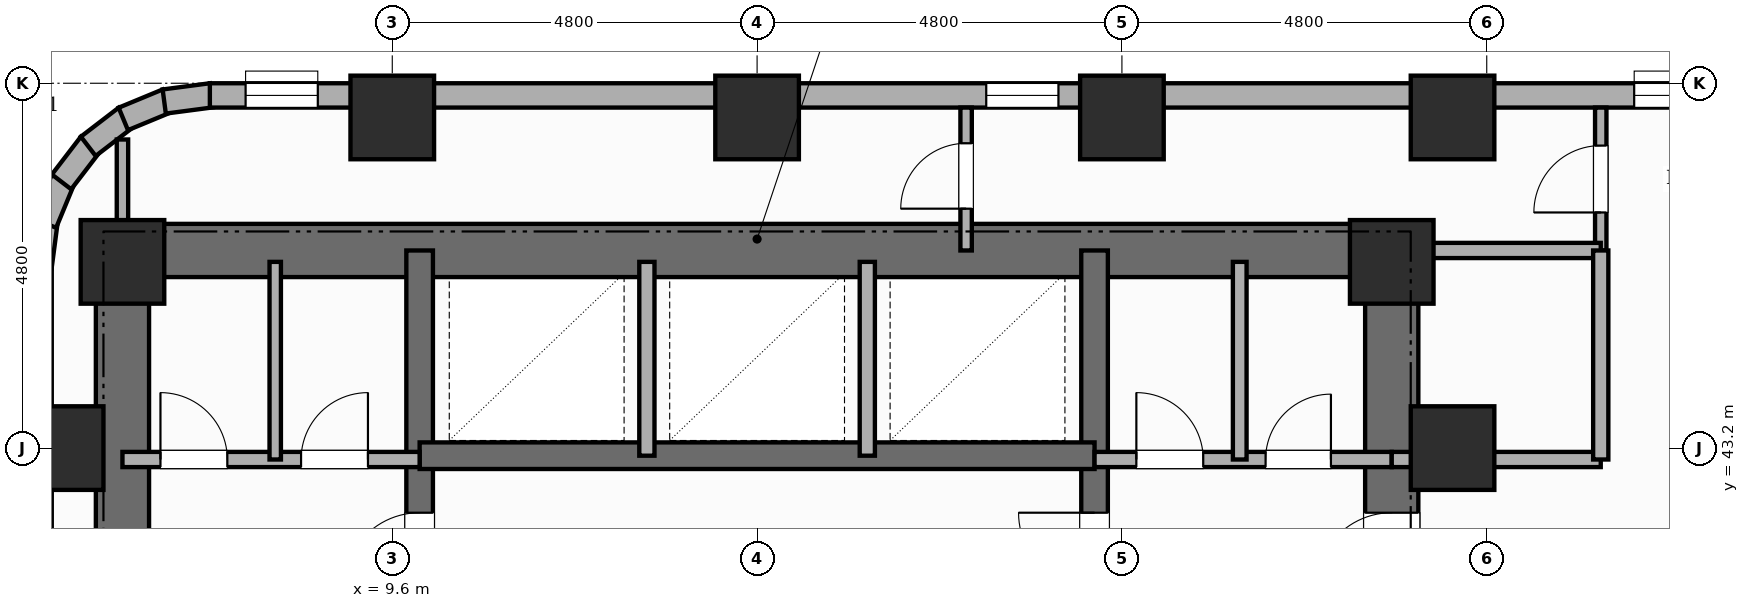
"""IFC4 building model, lengths in metres.
Left out: names, types, materials, properties, quantities, classifications, styles, units other than length and angle.
Written with IfcOpenShell. Run it as: python <this file> out.ifc"""

import sys

from ifc_helpers import new_model, si_unit, direction, frame, frame_2d, origin, origin_2d, place, context, subcontext, project, spatial, rectangle, extrude, element, fill, save


model = new_model("IFC4")
c1 = context("Model", 3, precision=1e-05, world=origin(), true_north=direction((0.0, 1.0)))
c2 = subcontext(c1, "Body", "Model", "MODEL_VIEW")
j1 = project(units=[si_unit("LENGTHUNIT", "METRE"), si_unit("PLANEANGLEUNIT", "RADIAN")], contexts=[c1])
p1 = place(None, origin())
s1 = spatial("IfcSite", under=j1, at=p1, CompositionType="ELEMENT")
p2 = place(p1, origin())
s2 = spatial("IfcBuilding", under=s1, at=p2, CompositionType="ELEMENT")
p3 = place(p2, frame((0.0, 0.0, 46.6)))
s3 = spatial("IfcBuildingStorey", under=s2, at=p3, CompositionType="ELEMENT", Elevation=46.6)
p4 = place(p3, frame((6.05, 30.55, 0.0), z_axis=(0.0, 0.0, 1.0), x_axis=(0.0, 1.0, 0.0)))
e1 = element("IfcWall", 1, at=p4, inside=s3, PredefinedType="SHEAR", context=c2, shape_type="SweptSolid", body=[
    extrude(rectangle(XDim=15.6, YDim=0.7, at=frame_2d((7.8, 0.0))), origin(), (0.0, 0.0, 1.0), 3.6),
])
p5 = place(p3, frame((22.75, 30.55, 0.0), z_axis=(0.0, 0.0, 1.0), x_axis=(0.0, 1.0, 0.0)))
e2 = element("IfcWall", 2, at=p5, inside=s3, PredefinedType="SHEAR", context=c2, shape_type="SweptSolid", body=[
    extrude(rectangle(XDim=15.6, YDim=0.7, at=frame_2d((7.8, 0.0))), origin(), (0.0, 0.0, 1.0), 3.6),
])
p6 = place(p5, frame((10.8, 0.0, 0.0)))
e3 = element("IfcOpeningElement", 3, at=p6, cuts=e2, PredefinedType="OPENING", context=c2, shape_type="SweptSolid", body=[
    extrude(rectangle(XDim=1.0, YDim=2.15, at=frame_2d((0.5, 1.075))), frame((0.0, 0.36, 0.0), z_axis=(0.0, -1.0, 0.0), x_axis=(1.0, 0.0, 0.0)), (0.0, 0.0, 1.0), 0.72),
])
p7 = place(p3, frame((6.05, 45.8, 0.0), z_axis=(0.0, 0.0, 1.0), x_axis=(1.0, 0.0, 0.0)))
e4 = element("IfcWall", 4, at=p7, inside=s3, PredefinedType="SHEAR", context=c2, shape_type="SweptSolid", body=[
    extrude(rectangle(XDim=16.7, YDim=0.7, at=frame_2d((8.35, 0.0))), origin(), (0.0, 0.0, 1.0), 3.6),
])
p8 = place(p3, frame((9.96, 30.9, 0.0), z_axis=(0.0, 0.0, 1.0), x_axis=(0.0, 1.0, 0.0)))
e5 = element("IfcWall", 5, at=p8, inside=s3, PredefinedType="SHEAR", context=c2, shape_type="SweptSolid", body=[
    extrude(rectangle(XDim=14.9, YDim=0.35, at=frame_2d((7.45, 0.0))), origin(), (0.0, 0.0, 1.0), 3.6),
])
p9 = place(p8, frame((0.65, 0.0, 0.0)))
e6 = element("IfcOpeningElement", 6, at=p9, cuts=e5, PredefinedType="OPENING", context=c2, shape_type="SweptSolid", body=[
    extrude(rectangle(XDim=0.95, YDim=2.1, at=frame_2d((0.475, 1.05))), frame((0.0, 0.185, 0.0), z_axis=(0.0, -1.0, 0.0), x_axis=(1.0, 0.0, 0.0)), (0.0, 0.0, 1.0), 0.37),
])
p10 = place(p8, frame((10.45, 0.0, 0.0)))
e7 = element("IfcOpeningElement", 7, at=p10, cuts=e5, PredefinedType="OPENING", context=c2, shape_type="SweptSolid", body=[
    extrude(rectangle(XDim=1.0, YDim=2.15, at=frame_2d((0.5, 1.075))), frame((0.0, 0.185, 0.0), z_axis=(0.0, -1.0, 0.0), x_axis=(1.0, 0.0, 0.0)), (0.0, 0.0, 1.0), 0.37),
])
p11 = place(p3, frame((18.84, 30.9, 0.0), z_axis=(0.0, 0.0, 1.0), x_axis=(0.0, 1.0, 0.0)))
e8 = element("IfcWall", 8, at=p11, inside=s3, PredefinedType="SHEAR", context=c2, shape_type="SweptSolid", body=[
    extrude(rectangle(XDim=14.9, YDim=0.35, at=frame_2d((7.45, 0.0))), origin(), (0.0, 0.0, 1.0), 3.6),
])
p12 = place(p11, frame((0.65, 0.0, 0.0)))
e9 = element("IfcOpeningElement", 9, at=p12, cuts=e8, PredefinedType="OPENING", context=c2, shape_type="SweptSolid", body=[
    extrude(rectangle(XDim=0.95, YDim=2.1, at=frame_2d((0.475, 1.05))), frame((0.0, 0.185, 0.0), z_axis=(0.0, -1.0, 0.0), x_axis=(1.0, 0.0, 0.0)), (0.0, 0.0, 1.0), 0.37),
])
p13 = place(p11, frame((10.45, 0.0, 0.0)))
e10 = element("IfcOpeningElement", 10, at=p13, cuts=e8, PredefinedType="OPENING", context=c2, shape_type="SweptSolid", body=[
    extrude(rectangle(XDim=1.0, YDim=2.15, at=frame_2d((0.5, 1.075))), frame((0.0, 0.185, 0.0), z_axis=(0.0, -1.0, 0.0), x_axis=(1.0, 0.0, 0.0)), (0.0, 0.0, 1.0), 0.37),
])
p14 = place(p3, frame((9.96, 43.1, 0.0), z_axis=(0.0, 0.0, 1.0), x_axis=(1.0, 0.0, 0.0)))
e11 = element("IfcWall", 11, at=p14, inside=s3, PredefinedType="SHEAR", context=c2, shape_type="SweptSolid", body=[
    extrude(rectangle(XDim=8.88, YDim=0.35, at=frame_2d((4.44, 0.0))), origin(), (0.0, 0.0, 1.0), 3.6),
])
for number, where, z_axis, x_axis in (
    (12, (5.25, 43.2, 0.0), (0.0, 0.0, 1.0), (1.0, 0.0, 0.0)),
    (13, (6.05, 45.65, 0.0), (0.0, 0.0, 1.0), (1.0, 0.0, 0.0)),
    (14, (9.6, 47.55, 0.0), (0.0, 0.0, 1.0), (1.0, 0.0, 0.0)),
    (15, (14.4, 47.55, 0.0), (0.0, 0.0, 1.0), (1.0, 0.0, 0.0)),
    (16, (19.2, 47.55, 0.0), (0.0, 0.0, 1.0), (1.0, 0.0, 0.0)),
    (17, (22.75, 45.65, 0.0), (0.0, 0.0, 1.0), (1.0, 0.0, 0.0)),
    (18, (23.55, 43.2, 0.0), (0.0, 0.0, 1.0), (1.0, 0.0, 0.0)),
    (19, (23.55, 47.55, 0.0), (0.0, 0.0, 1.0), (1.0, 0.0, 0.0)),
):
    element("IfcColumn", number, at=place(p3, frame(where, z_axis=z_axis, x_axis=x_axis)), inside=s3, PredefinedType="COLUMN", context=c2, shape_type="SweptSolid", body=[
        extrude(rectangle(XDim=1.1, YDim=1.1, at=origin_2d()), origin(), (0.0, 0.0, 1.0), 3.6),
    ])
for number, where, z_axis, x_axis in (
    (20, (4.958, 45.579, 0.0), (0.0, 0.0, 1.0), (0.131, 0.991, 0.0)),
    (21, (5.03, 46.16, 0.0), (0.0, 0.0, 1.0), (0.383, 0.924, 0.0)),
):
    element("IfcWall", number, at=place(p3, frame(where, z_axis=z_axis, x_axis=x_axis)), inside=s3, PredefinedType="STANDARD", context=c2, shape_type="SweptSolid", body=[
        extrude(rectangle(XDim=0.626, YDim=0.32, at=frame_2d((0.313, 0.0))), origin(), (0.0, 0.0, 1.0), 3.35),
    ])
p15 = place(p3, frame((5.248, 46.703, 0.0), z_axis=(0.0, 0.0, 1.0), x_axis=(0.608938521285, 0.7932174212, 0.0)))
e22 = element("IfcWall", 22, at=p15, inside=s3, PredefinedType="STANDARD", context=c2, shape_type="SweptSolid", body=[
    extrude(rectangle(XDim=0.627, YDim=0.32, at=frame_2d((0.313, 0.0))), origin(), (0.0, 0.0, 1.0), 3.35),
])
p16 = place(p3, frame((5.6, 47.17, 0.0), z_axis=(0.0, 0.0, 1.0), x_axis=(0.793405610854, 0.608693302629, 0.0)))
e23 = element("IfcWall", 23, at=p16, inside=s3, PredefinedType="STANDARD", context=c2, shape_type="SweptSolid", body=[
    extrude(rectangle(XDim=0.626, YDim=0.32, at=frame_2d((0.313, 0.0))), origin(), (0.0, 0.0, 1.0), 3.35),
])
p17 = place(p3, frame((6.061, 47.531, 0.0), z_axis=(0.0, 0.0, 1.0), x_axis=(0.923836271867, 0.382787856107, 0.0)))
e24 = element("IfcWall", 24, at=p17, inside=s3, PredefinedType="STANDARD", context=c2, shape_type="SweptSolid", body=[
    extrude(rectangle(XDim=0.626, YDim=0.32, at=frame_2d((0.313, 0.0))), origin(), (0.0, 0.0, 1.0), 3.35),
])
p18 = place(p3, frame((6.6, 47.76, 0.0), z_axis=(0.0, 0.0, 1.0), x_axis=(0.991447664465, 0.130504898859, 0.0)))
e25 = element("IfcWall", 25, at=p18, inside=s3, PredefinedType="STANDARD", context=c2, shape_type="SweptSolid", body=[
    extrude(rectangle(XDim=0.627, YDim=0.32, at=frame_2d((0.313, 0.0))), origin(), (0.0, 0.0, 1.0), 3.35),
])
p19 = place(p3, frame((7.2, 47.84, 0.0), z_axis=(0.0, 0.0, 1.0), x_axis=(1.0, 0.0, 0.0)))
e26 = element("IfcWall", 26, at=p19, inside=s3, PredefinedType="STANDARD", context=c2, shape_type="SweptSolid", body=[
    extrude(rectangle(XDim=48.0, YDim=0.32, at=frame_2d((24.0, 0.0))), origin(), (0.0, 0.0, 1.0), 2.53),
])
p20 = place(p19, frame((28.803, 0.0, 0.65)))
e27 = element("IfcOpeningElement", 27, at=p20, cuts=e26, PredefinedType="OPENING", context=c2, shape_type="SweptSolid", body=[
    extrude(rectangle(XDim=1.4, YDim=1.1, at=frame_2d((0.7, 0.55))), frame((0.0, 0.17, 0.0), z_axis=(0.0, -1.0, 0.0), x_axis=(1.0, 0.0, 0.0)), (0.0, 0.0, 1.0), 0.34),
])
p21 = place(p19, frame((47.094, 0.0, 0.45)))
e28 = element("IfcOpeningElement", 28, at=p21, cuts=e26, PredefinedType="OPENING", context=c2, shape_type="SweptSolid", body=[
    extrude(rectangle(XDim=0.6, YDim=1.8, at=frame_2d((0.3, 0.9))), frame((0.0, 0.17, 0.0), z_axis=(0.0, -1.0, 0.0), x_axis=(1.0, 0.0, 0.0)), (0.0, 0.0, 1.0), 0.34),
])
p22 = place(p19, frame((18.74, 0.0, 0.45)))
e29 = element("IfcOpeningElement", 29, at=p22, cuts=e26, PredefinedType="OPENING", context=c2, shape_type="SweptSolid", body=[
    extrude(rectangle(XDim=0.95, YDim=1.8, at=frame_2d((0.475, 0.9))), frame((0.0, 0.17, 0.0), z_axis=(0.0, -1.0, 0.0), x_axis=(1.0, 0.0, 0.0)), (0.0, 0.0, 1.0), 0.34),
])
p23 = place(p19, frame((41.65, 0.0, 0.45)))
e30 = element("IfcOpeningElement", 30, at=p23, cuts=e26, PredefinedType="OPENING", context=c2, shape_type="SweptSolid", body=[
    extrude(rectangle(XDim=0.75, YDim=1.8, at=frame_2d((0.375, 0.9))), frame((0.0, 0.17, 0.0), z_axis=(0.0, -1.0, 0.0), x_axis=(1.0, 0.0, 0.0)), (0.0, 0.0, 1.0), 0.34),
])
p24 = place(p19, frame((37.736, 0.0, 0.65)))
e31 = element("IfcOpeningElement", 31, at=p24, cuts=e26, PredefinedType="OPENING", context=c2, shape_type="SweptSolid", body=[
    extrude(rectangle(XDim=1.4, YDim=1.1, at=frame_2d((0.7, 0.55))), frame((0.0, 0.17, 0.0), z_axis=(0.0, -1.0, 0.0), x_axis=(1.0, 0.0, 0.0)), (0.0, 0.0, 1.0), 0.34),
])
p25 = place(p19, frame((0.47, 0.0, 0.45)))
e32 = element("IfcOpeningElement", 32, at=p25, cuts=e26, PredefinedType="OPENING", context=c2, shape_type="SweptSolid", body=[
    extrude(rectangle(XDim=0.95, YDim=1.8, at=frame_2d((0.475, 0.9))), frame((0.0, 0.17, 0.0), z_axis=(0.0, -1.0, 0.0), x_axis=(1.0, 0.0, 0.0)), (0.0, 0.0, 1.0), 0.34),
])
p26 = place(p19, frame((10.215, 0.0, 0.45)))
e33 = element("IfcOpeningElement", 33, at=p26, cuts=e26, PredefinedType="OPENING", context=c2, shape_type="SweptSolid", body=[
    extrude(rectangle(XDim=0.95, YDim=1.8, at=frame_2d((0.475, 0.9))), frame((0.0, 0.17, 0.0), z_axis=(0.0, -1.0, 0.0), x_axis=(1.0, 0.0, 0.0)), (0.0, 0.0, 1.0), 0.34),
])
p27 = place(p19, frame((23.43, 0.0, 0.65)))
e34 = element("IfcOpeningElement", 34, at=p27, cuts=e26, PredefinedType="OPENING", context=c2, shape_type="SweptSolid", body=[
    extrude(rectangle(XDim=1.4, YDim=1.1, at=frame_2d((0.7, 0.55))), frame((0.0, 0.17, 0.0), z_axis=(0.0, -1.0, 0.0), x_axis=(1.0, 0.0, 0.0)), (0.0, 0.0, 1.0), 0.34),
])
p28 = place(p19, frame((42.95, 0.0, 0.65)))
e35 = element("IfcOpeningElement", 35, at=p28, cuts=e26, PredefinedType="OPENING", context=c2, shape_type="SweptSolid", body=[
    extrude(rectangle(XDim=1.4, YDim=1.1, at=frame_2d((0.7, 0.55))), frame((0.0, 0.17, 0.0), z_axis=(0.0, -1.0, 0.0), x_axis=(1.0, 0.0, 0.0)), (0.0, 0.0, 1.0), 0.34),
])
p29 = place(p19, frame((45.984, 0.0, 0.45)))
e36 = element("IfcOpeningElement", 36, at=p29, cuts=e26, PredefinedType="OPENING", context=c2, shape_type="SweptSolid", body=[
    extrude(rectangle(XDim=0.6, YDim=1.8, at=frame_2d((0.3, 0.9))), frame((0.0, 0.17, 0.0), z_axis=(0.0, -1.0, 0.0), x_axis=(1.0, 0.0, 0.0)), (0.0, 0.0, 1.0), 0.34),
])
p30 = place(p3, frame((18.84, 43.05, 0.0), z_axis=(0.0, 0.0, 1.0), x_axis=(1.0, 0.0, 0.0)))
e37 = element("IfcWall", 37, at=p30, inside=s3, PredefinedType="POLYGONAL", context=c2, shape_type="SweptSolid", body=[
    extrude(rectangle(XDim=3.91, YDim=0.2, at=frame_2d((1.955, 0.0))), origin(), (0.0, 0.0, 1.0), 2.53),
])
p31 = place(p30, frame((0.55, 0.0, 0.0)))
e38 = element("IfcOpeningElement", 38, at=p31, cuts=e37, PredefinedType="OPENING", context=c2, shape_type="SweptSolid", body=[
    extrude(rectangle(XDim=0.88, YDim=2.1, at=frame_2d((0.44, 1.05))), frame((0.0, 0.11, 0.0), z_axis=(0.0, -1.0, 0.0), x_axis=(1.0, 0.0, 0.0)), (0.0, 0.0, 1.0), 0.22),
])
p32 = place(p30, frame((2.25, 0.0, 0.0)))
e39 = element("IfcOpeningElement", 39, at=p32, cuts=e37, PredefinedType="OPENING", context=c2, shape_type="SweptSolid", body=[
    extrude(rectangle(XDim=0.86, YDim=2.1, at=frame_2d((0.43, 1.05))), frame((0.0, 0.11, 0.0), z_axis=(0.0, -1.0, 0.0), x_axis=(1.0, 0.0, 0.0)), (0.0, 0.0, 1.0), 0.22),
])
p33 = place(p3, frame((6.05, 43.05, 0.0), z_axis=(0.0, 0.0, 1.0), x_axis=(1.0, 0.0, 0.0)))
e40 = element("IfcWall", 40, at=p33, inside=s3, PredefinedType="POLYGONAL", context=c2, shape_type="SweptSolid", body=[
    extrude(rectangle(XDim=3.91, YDim=0.2, at=frame_2d((1.955, 0.0))), origin(), (0.0, 0.0, 1.0), 2.53),
])
p34 = place(p33, frame((0.5, 0.0, 0.0)))
e41 = element("IfcOpeningElement", 41, at=p34, cuts=e40, PredefinedType="OPENING", context=c2, shape_type="SweptSolid", body=[
    extrude(rectangle(XDim=0.88, YDim=2.1, at=frame_2d((0.44, 1.05))), frame((0.0, 0.11, 0.0), z_axis=(0.0, -1.0, 0.0), x_axis=(1.0, 0.0, 0.0)), (0.0, 0.0, 1.0), 0.22),
])
p35 = place(p33, frame((2.35, 0.0, 0.0)))
e42 = element("IfcOpeningElement", 42, at=p35, cuts=e40, PredefinedType="OPENING", context=c2, shape_type="SweptSolid", body=[
    extrude(rectangle(XDim=0.88, YDim=2.1, at=frame_2d((0.44, 1.05))), frame((0.0, 0.11, 0.0), z_axis=(0.0, -1.0, 0.0), x_axis=(1.0, 0.0, 0.0)), (0.0, 0.0, 1.0), 0.22),
])
for number, where, z_axis, x_axis in (
    (43, (12.95, 43.1, 0.0), (0.0, 0.0, 1.0), (0.0, 1.0, 0.0)),
    (44, (15.85, 43.1, 0.0), (0.0, 0.0, 1.0), (0.0, 1.0, 0.0)),
):
    element("IfcWall", number, at=place(p3, frame(where, z_axis=z_axis, x_axis=x_axis)), inside=s3, PredefinedType="POLYGONAL", context=c2, shape_type="SweptSolid", body=[
        extrude(rectangle(XDim=2.55, YDim=0.2, at=frame_2d((1.275, 0.0))), origin(), (0.0, 0.0, 1.0), 3.35),
    ])
p36 = place(p3, frame((8.06, 43.05, 0.0), z_axis=(0.0, 0.0, 1.0), x_axis=(0.0, 1.0, 0.0)))
e45 = element("IfcWall", 45, at=p36, inside=s3, PredefinedType="PARTITIONING", context=c2, shape_type="SweptSolid", body=[
    extrude(rectangle(XDim=2.6, YDim=0.15, at=frame_2d((1.3, 0.0))), origin(), (0.0, 0.0, 1.0), 3.35),
])
p37 = place(p3, frame((20.75, 43.05, 0.0), z_axis=(0.0, 0.0, 1.0), x_axis=(0.0, 1.0, 0.0)))
e46 = element("IfcWall", 46, at=p37, inside=s3, PredefinedType="PLUMBINGWALL", context=c2, shape_type="SweptSolid", body=[
    extrude(rectangle(XDim=2.6, YDim=0.18, at=frame_2d((1.3, 0.0))), origin(), (0.0, 0.0, 1.0), 3.35),
])
p38 = place(p3, frame((25.5, 45.8, 0.0), z_axis=(0.0, 0.0, 1.0), x_axis=(0.0, 1.0, 0.0)))
e47 = element("IfcWall", 47, at=p38, inside=s3, PredefinedType="PARTITIONING", context=c2, shape_type="SweptSolid", body=[
    extrude(rectangle(XDim=1.88, YDim=0.15, at=frame_2d((0.94, 0.0))), origin(), (0.0, 0.0, 1.0), 3.35),
])
p39 = place(p38, frame((0.5, 0.0, 0.0)))
e48 = element("IfcOpeningElement", 48, at=p39, cuts=e47, PredefinedType="OPENING", context=c2, shape_type="SweptSolid", body=[
    extrude(rectangle(XDim=0.88, YDim=2.1, at=frame_2d((0.44, 1.05))), frame((0.0, 0.085, 0.0), z_axis=(0.0, -1.0, 0.0), x_axis=(1.0, 0.0, 0.0)), (0.0, 0.0, 1.0), 0.17),
])
p40 = place(p3, frame((22.75, 45.8, 0.0), z_axis=(0.0, 0.0, 1.0), x_axis=(1.0, 0.0, 0.0)))
e49 = element("IfcWall", 49, at=p40, inside=s3, PredefinedType="PARTITIONING", context=c2, shape_type="SweptSolid", body=[
    extrude(rectangle(XDim=2.75, YDim=0.2, at=frame_2d((1.375, 0.0))), origin(), (0.0, 0.0, 1.0), 3.35),
])
p41 = place(p3, frame((6.05, 45.8, 0.0), z_axis=(0.0, 0.0, 1.0), x_axis=(0.0, 1.0, 0.0)))
e50 = element("IfcWall", 50, at=p41, inside=s3, PredefinedType="PARTITIONING", context=c2, shape_type="SweptSolid", body=[
    extrude(rectangle(XDim=1.46, YDim=0.15, at=frame_2d((0.73, 0.0))), origin(), (0.0, 0.0, 1.0), 3.35),
])
p42 = place(p3, frame((17.15, 45.8, 0.0), z_axis=(0.0, 0.0, 1.0), x_axis=(0.0, 1.0, 0.0)))
e51 = element("IfcWall", 51, at=p42, inside=s3, PredefinedType="PARTITIONING", context=c2, shape_type="SweptSolid", body=[
    extrude(rectangle(XDim=1.88, YDim=0.15, at=frame_2d((0.94, 0.0))), origin(), (0.0, 0.0, 1.0), 3.35),
])
p43 = place(p42, frame((0.55, 0.0, 0.0)))
e52 = element("IfcOpeningElement", 52, at=p43, cuts=e51, PredefinedType="OPENING", context=c2, shape_type="SweptSolid", body=[
    extrude(rectangle(XDim=0.86, YDim=2.1, at=frame_2d((0.43, 1.05))), frame((0.0, 0.085, 0.0), z_axis=(0.0, -1.0, 0.0), x_axis=(1.0, 0.0, 0.0)), (0.0, 0.0, 1.0), 0.17),
])
p44 = place(p3, frame((22.75, 43.05, 0.0), z_axis=(0.0, 0.0, 1.0), x_axis=(1.0, 0.0, 0.0)))
e53 = element("IfcWall", 53, at=p44, inside=s3, PredefinedType="PARTITIONING", context=c2, shape_type="SweptSolid", body=[
    extrude(rectangle(XDim=2.75, YDim=0.2, at=frame_2d((1.375, 0.0))), origin(), (0.0, 0.0, 1.0), 2.53),
])
p45 = place(p3, frame((25.5, 43.05, 0.0), z_axis=(0.0, 0.0, 1.0), x_axis=(0.0, 1.0, 0.0)))
e54 = element("IfcWall", 54, at=p45, inside=s3, PredefinedType="PARTITIONING", context=c2, shape_type="SweptSolid", body=[
    extrude(rectangle(XDim=2.75, YDim=0.2, at=frame_2d((1.375, 0.0))), origin(), (0.0, 0.0, 1.0), 3.35),
])
p46 = place(p22, origin())
e55 = element("IfcWindow", 55, at=p46, inside=s3, PartitioningType="SINGLE_PANEL", PredefinedType="WINDOW", context=c2, shape_type="SweptSolid", body=[
    extrude(rectangle(XDim=0.95, YDim=1.8, at=frame_2d((0.475, 0.9))), frame((0.0, 0.03, 0.0), z_axis=(0.0, -1.0, 0.0), x_axis=(1.0, 0.0, 0.0)), (0.0, 0.0, 1.0), 0.06),
])
fill(e29, e55)
p47 = place(p25, origin())
e56 = element("IfcWindow", 56, at=p47, inside=s3, PartitioningType="SINGLE_PANEL", PredefinedType="WINDOW", context=c2, shape_type="SweptSolid", body=[
    extrude(rectangle(XDim=0.95, YDim=1.8, at=frame_2d((0.475, 0.9))), frame((0.0, 0.03, 0.0), z_axis=(0.0, -1.0, 0.0), x_axis=(1.0, 0.0, 0.0)), (0.0, 0.0, 1.0), 0.06),
])
fill(e32, e56)
p48 = place(p26, origin())
e57 = element("IfcWindow", 57, at=p48, inside=s3, PartitioningType="SINGLE_PANEL", PredefinedType="WINDOW", context=c2, shape_type="SweptSolid", body=[
    extrude(rectangle(XDim=0.95, YDim=1.8, at=frame_2d((0.475, 0.9))), frame((0.0, 0.03, 0.0), z_axis=(0.0, -1.0, 0.0), x_axis=(1.0, 0.0, 0.0)), (0.0, 0.0, 1.0), 0.06),
])
fill(e33, e57)
p49 = place(p10, origin())
e58 = element("IfcDoor", 58, at=p49, inside=s3, OperationType="SINGLE_SWING_LEFT", PredefinedType="DOOR", context=c2, shape_type="SweptSolid", body=[
    extrude(rectangle(XDim=1.0, YDim=2.15, at=frame_2d((0.5, 1.075))), frame((0.0, 0.025, 0.0), z_axis=(0.0, -1.0, 0.0), x_axis=(1.0, 0.0, 0.0)), (0.0, 0.0, 1.0), 0.05),
])
fill(e7, e58)
p50 = place(p13, origin())
e59 = element("IfcDoor", 59, at=p50, inside=s3, OperationType="SINGLE_SWING_RIGHT", PredefinedType="DOOR", context=c2, shape_type="SweptSolid", body=[
    extrude(rectangle(XDim=1.0, YDim=2.15, at=frame_2d((0.5, 1.075))), frame((0.0, 0.025, 0.0), z_axis=(0.0, -1.0, 0.0), x_axis=(1.0, 0.0, 0.0)), (0.0, 0.0, 1.0), 0.05),
])
fill(e10, e59)
p51 = place(p6, origin())
e60 = element("IfcDoor", 60, at=p51, inside=s3, OperationType="SINGLE_SWING_LEFT", PredefinedType="DOOR", context=c2, shape_type="SweptSolid", body=[
    extrude(rectangle(XDim=1.0, YDim=2.15, at=frame_2d((0.5, 1.075))), frame((0.0, 0.025, 0.0), z_axis=(0.0, -1.0, 0.0), x_axis=(1.0, 0.0, 0.0)), (0.0, 0.0, 1.0), 0.05),
])
fill(e3, e60)
p52 = place(p34, origin())
e61 = element("IfcDoor", 61, at=p52, inside=s3, OperationType="SINGLE_SWING_LEFT", PredefinedType="DOOR", context=c2, shape_type="SweptSolid", body=[
    extrude(rectangle(XDim=0.88, YDim=2.1, at=frame_2d((0.44, 1.05))), frame((0.0, 0.025, 0.0), z_axis=(0.0, -1.0, 0.0), x_axis=(1.0, 0.0, 0.0)), (0.0, 0.0, 1.0), 0.05),
])
fill(e41, e61)
p53 = place(p35, origin())
e62 = element("IfcDoor", 62, at=p53, inside=s3, OperationType="SINGLE_SWING_RIGHT", PredefinedType="DOOR", context=c2, shape_type="SweptSolid", body=[
    extrude(rectangle(XDim=0.88, YDim=2.1, at=frame_2d((0.44, 1.05))), frame((0.0, 0.025, 0.0), z_axis=(0.0, -1.0, 0.0), x_axis=(1.0, 0.0, 0.0)), (0.0, 0.0, 1.0), 0.05),
])
fill(e42, e62)
p54 = place(p31, origin())
e63 = element("IfcDoor", 63, at=p54, inside=s3, OperationType="SINGLE_SWING_LEFT", PredefinedType="DOOR", context=c2, shape_type="SweptSolid", body=[
    extrude(rectangle(XDim=0.88, YDim=2.1, at=frame_2d((0.44, 1.05))), frame((0.0, 0.025, 0.0), z_axis=(0.0, -1.0, 0.0), x_axis=(1.0, 0.0, 0.0)), (0.0, 0.0, 1.0), 0.05),
])
fill(e38, e63)
p55 = place(p32, origin())
e64 = element("IfcDoor", 64, at=p55, inside=s3, OperationType="SINGLE_SWING_RIGHT", PredefinedType="DOOR", context=c2, shape_type="SweptSolid", body=[
    extrude(rectangle(XDim=0.86, YDim=2.1, at=frame_2d((0.43, 1.05))), frame((0.0, 0.025, 0.0), z_axis=(0.0, -1.0, 0.0), x_axis=(1.0, 0.0, 0.0)), (0.0, 0.0, 1.0), 0.05),
])
fill(e39, e64)
p56 = place(p39, origin())
e65 = element("IfcDoor", 65, at=p56, inside=s3, OperationType="SINGLE_SWING_LEFT", PredefinedType="DOOR", context=c2, shape_type="SweptSolid", body=[
    extrude(rectangle(XDim=0.88, YDim=2.1, at=frame_2d((0.44, 1.05))), frame((0.0, 0.025, 0.0), z_axis=(0.0, -1.0, 0.0), x_axis=(1.0, 0.0, 0.0)), (0.0, 0.0, 1.0), 0.05),
])
fill(e48, e65)
p57 = place(p43, origin())
e66 = element("IfcDoor", 66, at=p57, inside=s3, OperationType="SINGLE_SWING_LEFT", PredefinedType="DOOR", context=c2, shape_type="SweptSolid", body=[
    extrude(rectangle(XDim=0.86, YDim=2.1, at=frame_2d((0.43, 1.05))), frame((0.0, 0.025, 0.0), z_axis=(0.0, -1.0, 0.0), x_axis=(1.0, 0.0, 0.0)), (0.0, 0.0, 1.0), 0.05),
])
fill(e52, e66)
save(model, sys.argv[1])
